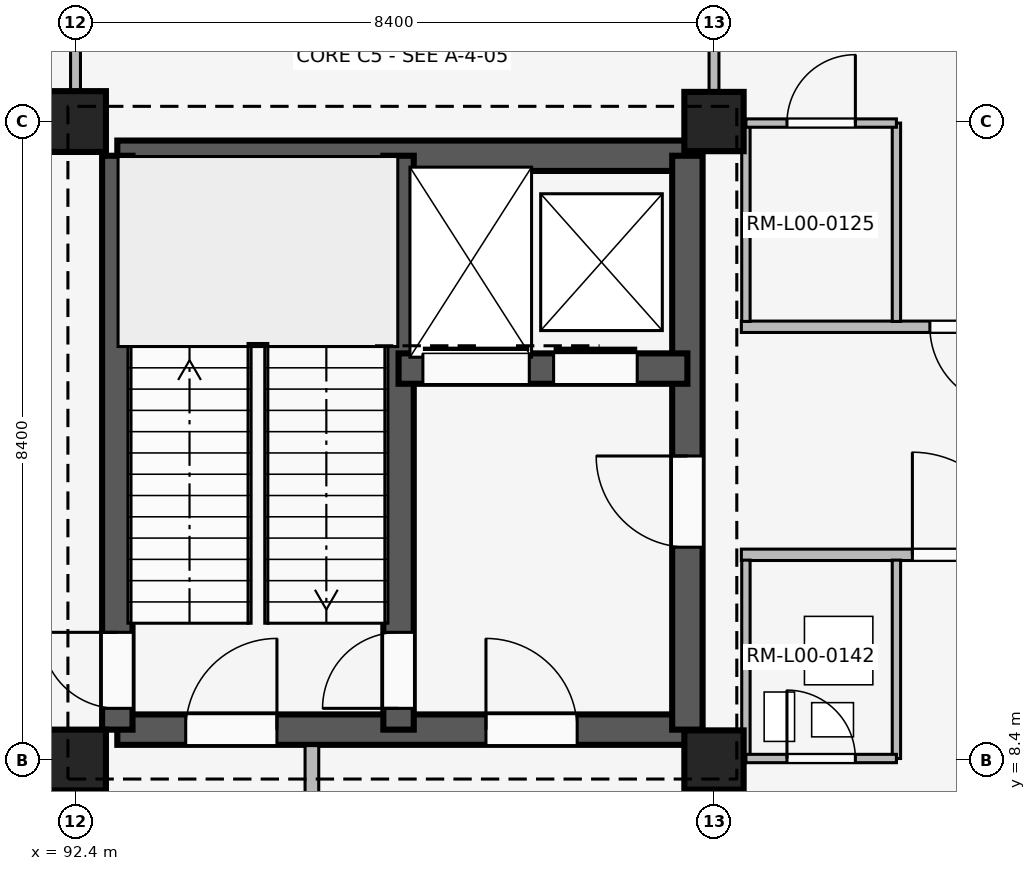
"""IFC4 building model, lengths in metres.
Left out: names, types, materials, properties, quantities, classifications, styles, units other than length and angle.
Written with IfcOpenShell. Run it as: python <this file> out.ifc"""

import sys

from ifc_helpers import new_model, si_unit, direction, frame, frame_2d, origin, origin_2d, place, context, subcontext, project, spatial, rectangle, extrude, element, fill, save


model = new_model("IFC4")
c1 = context("Model", 3, precision=1e-05, world=origin(), true_north=direction((0.0, 1.0)))
c2 = subcontext(c1, "Body", "Model", "MODEL_VIEW")
j1 = project(units=[si_unit("LENGTHUNIT", "METRE"), si_unit("PLANEANGLEUNIT", "RADIAN")], contexts=[c1])
p1 = place(None, origin())
s1 = spatial("IfcSite", under=j1, at=p1, CompositionType="ELEMENT")
p2 = place(p1, origin())
s2 = spatial("IfcBuilding", under=s1, at=p2, CompositionType="ELEMENT")
p3 = place(p2, origin())
s3 = spatial("IfcBuildingStorey", under=s2, at=p3, CompositionType="ELEMENT", Elevation=0.0)
for number, where, z_axis, x_axis in (
    (1, (92.4, 8.4, 0.0), (0.0, 0.0, 1.0), (1.0, 0.0, 0.0)),
    (2, (92.4, 16.8, 0.0), (0.0, 0.0, 1.0), (1.0, 0.0, 0.0)),
):
    element("IfcColumn", number, at=place(p3, frame(where, z_axis=z_axis, x_axis=x_axis)), inside=s3, PredefinedType="COLUMN", context=c2, shape_type="SweptSolid", body=[
        extrude(rectangle(XDim=0.8, YDim=0.8, at=origin_2d()), origin(), (0.0, 0.0, 1.0), 4.8),
    ])
for number, where, z_axis, x_axis in (
    (3, (100.8, 8.4, 0.0), (0.0, 0.0, 1.0), (1.0, 0.0, 0.0)),
    (4, (100.8, 16.8, 0.0), (0.0, 0.0, 1.0), (1.0, 0.0, 0.0)),
):
    element("IfcColumn", number, at=place(p3, frame(where, z_axis=z_axis, x_axis=x_axis)), inside=s3, PredefinedType="COLUMN", context=c2, shape_type="SweptSolid", body=[
        extrude(rectangle(XDim=0.78, YDim=0.78, at=origin_2d()), origin(), (0.0, 0.0, 1.0), 4.8),
    ])
p4 = place(p3, frame((92.95, 8.8, 0.0), z_axis=(0.0, 0.0, 1.0), x_axis=(1.0, 0.0, 0.0)))
e5 = element("IfcWall", 5, at=p4, inside=s3, PredefinedType="SHEAR", context=c2, shape_type="SweptSolid", body=[
    extrude(rectangle(XDim=7.5, YDim=0.4, at=frame_2d((3.75, 0.0))), origin(), (0.0, 0.0, 1.0), 4.52),
])
p5 = place(p4, frame((4.85, 0.0, 0.0)))
e6 = element("IfcOpeningElement", 6, at=p5, cuts=e5, PredefinedType="OPENING", context=c2, shape_type="SweptSolid", body=[
    extrude(rectangle(XDim=1.2, YDim=2.2, at=frame_2d((0.6, 1.1))), frame((0.0, 0.21, 0.0), z_axis=(0.0, -1.0, 0.0), x_axis=(1.0, 0.0, 0.0)), (0.0, 0.0, 1.0), 0.42),
])
p6 = place(p4, frame((0.9, 0.0, 0.0)))
e7 = element("IfcOpeningElement", 7, at=p6, cuts=e5, PredefinedType="OPENING", context=c2, shape_type="SweptSolid", body=[
    extrude(rectangle(XDim=1.2, YDim=2.2, at=frame_2d((0.6, 1.1))), frame((0.0, 0.21, 0.0), z_axis=(0.0, -1.0, 0.0), x_axis=(1.0, 0.0, 0.0)), (0.0, 0.0, 1.0), 0.42),
])
p7 = place(p3, frame((92.95, 16.35, 0.0), z_axis=(0.0, 0.0, 1.0), x_axis=(1.0, 0.0, 0.0)))
e8 = element("IfcWall", 8, at=p7, inside=s3, PredefinedType="SHEAR", context=c2, shape_type="SweptSolid", body=[
    extrude(rectangle(XDim=7.5, YDim=0.4, at=frame_2d((3.75, 0.0))), origin(), (0.0, 0.0, 1.0), 4.52),
])
p8 = place(p3, frame((92.95, 8.8, 0.0), z_axis=(0.0, 0.0, 1.0), x_axis=(0.0, 1.0, 0.0)))
e9 = element("IfcWall", 9, at=p8, inside=s3, PredefinedType="SHEAR", context=c2, shape_type="SweptSolid", body=[
    extrude(rectangle(XDim=7.55, YDim=0.4, at=frame_2d((3.775, 0.0))), origin(), (0.0, 0.0, 1.0), 4.52),
])
p9 = place(p8, frame((0.28, 0.0, 0.0)))
e10 = element("IfcOpeningElement", 10, at=p9, cuts=e9, PredefinedType="OPENING", context=c2, shape_type="SweptSolid", body=[
    extrude(rectangle(XDim=1.0, YDim=2.15, at=frame_2d((0.5, 1.075))), frame((0.0, 0.21, 0.0), z_axis=(0.0, -1.0, 0.0), x_axis=(1.0, 0.0, 0.0)), (0.0, 0.0, 1.0), 0.42),
])
p10 = place(p3, frame((100.45, 8.8, 0.0), z_axis=(0.0, 0.0, 1.0), x_axis=(0.0, 1.0, 0.0)))
e11 = element("IfcWall", 11, at=p10, inside=s3, PredefinedType="SHEAR", context=c2, shape_type="SweptSolid", body=[
    extrude(rectangle(XDim=7.55, YDim=0.4, at=frame_2d((3.775, 0.0))), origin(), (0.0, 0.0, 1.0), 4.52),
])
p11 = place(p10, frame((2.4, 0.0, 0.0)))
e12 = element("IfcOpeningElement", 12, at=p11, cuts=e11, PredefinedType="OPENING", context=c2, shape_type="SweptSolid", body=[
    extrude(rectangle(XDim=1.2, YDim=2.2, at=frame_2d((0.6, 1.1))), frame((0.0, 0.21, 0.0), z_axis=(0.0, -1.0, 0.0), x_axis=(1.0, 0.0, 0.0)), (0.0, 0.0, 1.0), 0.42),
])
p12 = place(p3, frame((96.65, 8.8, 0.0), z_axis=(0.0, 0.0, 1.0), x_axis=(0.0, 1.0, 0.0)))
e13 = element("IfcWall", 13, at=p12, inside=s3, PredefinedType="SHEAR", context=c2, shape_type="SweptSolid", body=[
    extrude(rectangle(XDim=7.55, YDim=0.4, at=frame_2d((3.775, 0.0))), origin(), (0.0, 0.0, 1.0), 4.52),
])
p13 = place(p12, frame((0.28, 0.0, 0.0)))
e14 = element("IfcOpeningElement", 14, at=p13, cuts=e13, PredefinedType="OPENING", context=c2, shape_type="SweptSolid", body=[
    extrude(rectangle(XDim=1.0, YDim=2.15, at=frame_2d((0.5, 1.075))), frame((0.0, 0.21, 0.0), z_axis=(0.0, -1.0, 0.0), x_axis=(1.0, 0.0, 0.0)), (0.0, 0.0, 1.0), 0.42),
])
p14 = place(p3, frame((96.65, 13.55, 0.0), z_axis=(0.0, 0.0, 1.0), x_axis=(1.0, 0.0, 0.0)))
e15 = element("IfcWall", 15, at=p14, inside=s3, PredefinedType="SHEAR", context=c2, shape_type="SweptSolid", body=[
    extrude(rectangle(XDim=3.8, YDim=0.4, at=frame_2d((1.9, 0.0))), origin(), (0.0, 0.0, 1.0), 4.52),
])
p15 = place(p14, frame((0.32, 0.0, 0.0)))
e16 = element("IfcOpeningElement", 16, at=p15, cuts=e15, PredefinedType="OPENING", context=c2, shape_type="SweptSolid", body=[
    extrude(rectangle(XDim=1.4, YDim=2.25, at=frame_2d((0.7, 1.125))), frame((0.0, 0.21, 0.0), z_axis=(0.0, -1.0, 0.0), x_axis=(1.0, 0.0, 0.0)), (0.0, 0.0, 1.0), 0.42),
])
p16 = place(p14, frame((2.04, 0.0, 0.0)))
e17 = element("IfcOpeningElement", 17, at=p16, cuts=e15, PredefinedType="OPENING", context=c2, shape_type="SweptSolid", body=[
    extrude(rectangle(XDim=1.1, YDim=2.15, at=frame_2d((0.55, 1.075))), frame((0.0, 0.21, 0.0), z_axis=(0.0, -1.0, 0.0), x_axis=(1.0, 0.0, 0.0)), (0.0, 0.0, 1.0), 0.42),
])
p17 = place(p3, frame((92.4, 0.14, 0.0), z_axis=(0.0, 0.0, 1.0), x_axis=(0.0, 1.0, 0.0)))
e18 = element("IfcWall", 18, at=p17, inside=s3, PredefinedType="PARTITIONING", context=c2, shape_type="SweptSolid", body=[
    extrude(rectangle(XDim=8.21, YDim=0.13, at=frame_2d((4.105, 0.0))), origin(), (0.0, 0.0, 1.0), 3.8),
])
p18 = place(p17, frame((3.64, 0.0, 0.0)))
e19 = element("IfcOpeningElement", 19, at=p18, cuts=e18, PredefinedType="OPENING", context=c2, shape_type="SweptSolid", body=[
    extrude(rectangle(XDim=1.08, YDim=2.15, at=frame_2d((0.54, 1.075))), frame((0.0, 0.075, 0.0), z_axis=(0.0, -1.0, 0.0), x_axis=(1.0, 0.0, 0.0)), (0.0, 0.0, 1.0), 0.15),
])
p19 = place(p3, frame((92.4, 17.15, 0.0), z_axis=(0.0, 0.0, 1.0), x_axis=(0.0, 1.0, 0.0)))
e20 = element("IfcWall", 20, at=p19, inside=s3, PredefinedType="PARTITIONING", context=c2, shape_type="SweptSolid", body=[
    extrude(rectangle(XDim=7.91, YDim=0.13, at=frame_2d((3.955, 0.0))), origin(), (0.0, 0.0, 1.0), 3.8),
])
p20 = place(p19, frame((3.4, 0.0, 0.0)))
e21 = element("IfcOpeningElement", 21, at=p20, cuts=e20, PredefinedType="OPENING", context=c2, shape_type="SweptSolid", body=[
    extrude(rectangle(XDim=1.05, YDim=2.2, at=frame_2d((0.525, 1.1))), frame((0.0, 0.075, 0.0), z_axis=(0.0, -1.0, 0.0), x_axis=(1.0, 0.0, 0.0)), (0.0, 0.0, 1.0), 0.15),
])
p21 = place(p3, frame((95.51, 0.14, 0.0), z_axis=(0.0, 0.0, 1.0), x_axis=(0.0, 1.0, 0.0)))
e22 = element("IfcWall", 22, at=p21, inside=s3, PredefinedType="PARTITIONING", context=c2, shape_type="SweptSolid", body=[
    extrude(rectangle(XDim=8.45, YDim=0.18, at=frame_2d((4.225, 0.0))), origin(), (0.0, 0.0, 1.0), 3.8),
])
p22 = place(p3, frame((100.8, 0.14, 0.0), z_axis=(0.0, 0.0, 1.0), x_axis=(0.0, 1.0, 0.0)))
e23 = element("IfcWall", 23, at=p22, inside=s3, PredefinedType="PARTITIONING", context=c2, shape_type="SweptSolid", body=[
    extrude(rectangle(XDim=8.21, YDim=0.13, at=frame_2d((4.105, 0.0))), origin(), (0.0, 0.0, 1.0), 3.8),
])
p23 = place(p22, frame((3.64, 0.0, 0.0)))
e24 = element("IfcOpeningElement", 24, at=p23, cuts=e23, PredefinedType="OPENING", context=c2, shape_type="SweptSolid", body=[
    extrude(rectangle(XDim=1.08, YDim=2.15, at=frame_2d((0.54, 1.075))), frame((0.0, 0.075, 0.0), z_axis=(0.0, -1.0, 0.0), x_axis=(1.0, 0.0, 0.0)), (0.0, 0.0, 1.0), 0.15),
])
p24 = place(p3, frame((100.8, 17.15, 0.0), z_axis=(0.0, 0.0, 1.0), x_axis=(0.0, 1.0, 0.0)))
e25 = element("IfcWall", 25, at=p24, inside=s3, PredefinedType="PARTITIONING", context=c2, shape_type="SweptSolid", body=[
    extrude(rectangle(XDim=7.91, YDim=0.13, at=frame_2d((3.955, 0.0))), origin(), (0.0, 0.0, 1.0), 3.8),
])
p25 = place(p24, frame((3.4, 0.0, 0.0)))
e26 = element("IfcOpeningElement", 26, at=p25, cuts=e25, PredefinedType="OPENING", context=c2, shape_type="SweptSolid", body=[
    extrude(rectangle(XDim=1.05, YDim=2.2, at=frame_2d((0.525, 1.1))), frame((0.0, 0.075, 0.0), z_axis=(0.0, -1.0, 0.0), x_axis=(1.0, 0.0, 0.0)), (0.0, 0.0, 1.0), 0.15),
])
p26 = place(p3, frame((101.16, 11.1, 0.0), z_axis=(0.0, 0.0, 1.0), x_axis=(1.0, 0.0, 0.0)))
e27 = element("IfcWall", 27, at=p26, inside=s3, PredefinedType="PARTITIONING", context=c2, shape_type="SweptSolid", body=[
    extrude(rectangle(XDim=7.96, YDim=0.15, at=frame_2d((3.98, 0.0))), origin(), (0.0, 0.0, 1.0), 3.8),
])
p27 = place(p26, frame((2.25, 0.0, 0.0)))
e28 = element("IfcOpeningElement", 28, at=p27, cuts=e27, PredefinedType="OPENING", context=c2, shape_type="SweptSolid", body=[
    extrude(rectangle(XDim=1.35, YDim=2.25, at=frame_2d((0.675, 1.125))), frame((0.0, 0.085, 0.0), z_axis=(0.0, -1.0, 0.0), x_axis=(1.0, 0.0, 0.0)), (0.0, 0.0, 1.0), 0.17),
])
p28 = place(p26, frame((5.95, 0.0, 0.0)))
e29 = element("IfcOpeningElement", 29, at=p28, cuts=e27, PredefinedType="OPENING", context=c2, shape_type="SweptSolid", body=[
    extrude(rectangle(XDim=1.35, YDim=2.25, at=frame_2d((0.675, 1.125))), frame((0.0, 0.085, 0.0), z_axis=(0.0, -1.0, 0.0), x_axis=(1.0, 0.0, 0.0)), (0.0, 0.0, 1.0), 0.17),
])
for number, where, z_axis, x_axis in (
    (30, (101.22, 8.42, 0.0), (0.0, 0.0, 1.0), (0.0, 1.0, 0.0)),
    (31, (103.2, 8.42, 0.0), (0.0, 0.0, 1.0), (0.0, 1.0, 0.0)),
):
    element("IfcWall", number, at=place(p3, frame(where, z_axis=z_axis, x_axis=x_axis)), inside=s3, PredefinedType="PARTITIONING", context=c2, shape_type="SweptSolid", body=[
        extrude(rectangle(XDim=2.61, YDim=0.11, at=frame_2d((1.305, 0.0))), origin(), (0.0, 0.0, 1.0), 3.8),
    ])
p29 = place(p3, frame((101.22, 8.42, 0.0), z_axis=(0.0, 0.0, 1.0), x_axis=(1.0, 0.0, 0.0)))
e32 = element("IfcWall", 32, at=p29, inside=s3, PredefinedType="PARTITIONING", context=c2, shape_type="SweptSolid", body=[
    extrude(rectangle(XDim=1.98, YDim=0.11, at=frame_2d((0.99, 0.0))), origin(), (0.0, 0.0, 1.0), 3.8),
])
p30 = place(p29, frame((0.54, 0.0, 0.0)))
e33 = element("IfcOpeningElement", 33, at=p30, cuts=e32, PredefinedType="OPENING", context=c2, shape_type="SweptSolid", body=[
    extrude(rectangle(XDim=0.9, YDim=2.1, at=frame_2d((0.45, 1.05))), frame((0.0, 0.065, 0.0), z_axis=(0.0, -1.0, 0.0), x_axis=(1.0, 0.0, 0.0)), (0.0, 0.0, 1.0), 0.13),
])
p31 = place(p3, frame((109.12, 14.1, 0.0), z_axis=(0.0, 0.0, 1.0), x_axis=(-1.0, 0.0, 0.0)))
e34 = element("IfcWall", 34, at=p31, inside=s3, PredefinedType="PARTITIONING", context=c2, shape_type="SweptSolid", body=[
    extrude(rectangle(XDim=7.96, YDim=0.15, at=frame_2d((3.98, 0.0))), origin(), (0.0, 0.0, 1.0), 3.8),
])
p32 = place(p31, frame((0.73, 0.0, 0.0)))
e35 = element("IfcOpeningElement", 35, at=p32, cuts=e34, PredefinedType="OPENING", context=c2, shape_type="SweptSolid", body=[
    extrude(rectangle(XDim=1.05, YDim=2.2, at=frame_2d((0.525, 1.1))), frame((0.0, 0.085, 0.0), z_axis=(0.0, -1.0, 0.0), x_axis=(1.0, 0.0, 0.0)), (0.0, 0.0, 1.0), 0.17),
])
p33 = place(p31, frame((4.43, 0.0, 0.0)))
e36 = element("IfcOpeningElement", 36, at=p33, cuts=e34, PredefinedType="OPENING", context=c2, shape_type="SweptSolid", body=[
    extrude(rectangle(XDim=1.05, YDim=2.2, at=frame_2d((0.525, 1.1))), frame((0.0, 0.085, 0.0), z_axis=(0.0, -1.0, 0.0), x_axis=(1.0, 0.0, 0.0)), (0.0, 0.0, 1.0), 0.17),
])
for number, where, z_axis, x_axis in (
    (37, (101.22, 14.17, 0.0), (0.0, 0.0, 1.0), (0.0, 1.0, 0.0)),
    (38, (103.2, 14.17, 0.0), (0.0, 0.0, 1.0), (0.0, 1.0, 0.0)),
):
    element("IfcWall", number, at=place(p3, frame(where, z_axis=z_axis, x_axis=x_axis)), inside=s3, PredefinedType="PARTITIONING", context=c2, shape_type="SweptSolid", body=[
        extrude(rectangle(XDim=2.61, YDim=0.11, at=frame_2d((1.305, 0.0))), origin(), (0.0, 0.0, 1.0), 3.8),
    ])
p34 = place(p3, frame((101.22, 16.78, 0.0), z_axis=(0.0, 0.0, 1.0), x_axis=(1.0, 0.0, 0.0)))
e39 = element("IfcWall", 39, at=p34, inside=s3, PredefinedType="PARTITIONING", context=c2, shape_type="SweptSolid", body=[
    extrude(rectangle(XDim=1.98, YDim=0.11, at=frame_2d((0.99, 0.0))), origin(), (0.0, 0.0, 1.0), 3.8),
])
p35 = place(p34, frame((0.54, 0.0, 0.0)))
e40 = element("IfcOpeningElement", 40, at=p35, cuts=e39, PredefinedType="OPENING", context=c2, shape_type="SweptSolid", body=[
    extrude(rectangle(XDim=0.9, YDim=2.1, at=frame_2d((0.45, 1.05))), frame((0.0, 0.065, 0.0), z_axis=(0.0, -1.0, 0.0), x_axis=(1.0, 0.0, 0.0)), (0.0, 0.0, 1.0), 0.13),
])
p36 = place(p11, origin())
e41 = element("IfcDoor", 41, at=p36, inside=s3, OperationType="SINGLE_SWING_RIGHT", PredefinedType="DOOR", context=c2, shape_type="SweptSolid", body=[
    extrude(rectangle(XDim=1.2, YDim=2.2, at=frame_2d((0.6, 1.1))), frame((0.0, 0.025, 0.0), z_axis=(0.0, -1.0, 0.0), x_axis=(1.0, 0.0, 0.0)), (0.0, 0.0, 1.0), 0.05),
])
fill(e12, e41)
p37 = place(p5, origin())
e42 = element("IfcDoor", 42, at=p37, inside=s3, OperationType="SINGLE_SWING_LEFT", PredefinedType="DOOR", context=c2, shape_type="SweptSolid", body=[
    extrude(rectangle(XDim=1.2, YDim=2.2, at=frame_2d((0.6, 1.1))), frame((0.0, 0.025, 0.0), z_axis=(0.0, -1.0, 0.0), x_axis=(1.0, 0.0, 0.0)), (0.0, 0.0, 1.0), 0.05),
])
fill(e6, e42)
p38 = place(p9, origin())
e43 = element("IfcDoor", 43, at=p38, inside=s3, OperationType="SINGLE_SWING_RIGHT", PredefinedType="DOOR", context=c2, shape_type="SweptSolid", body=[
    extrude(rectangle(XDim=1.0, YDim=2.15, at=frame_2d((0.5, 1.075))), frame((0.0, 0.025, 0.0), z_axis=(0.0, -1.0, 0.0), x_axis=(1.0, 0.0, 0.0)), (0.0, 0.0, 1.0), 0.05),
])
fill(e10, e43)
p39 = place(p13, origin())
e44 = element("IfcDoor", 44, at=p39, inside=s3, OperationType="SINGLE_SWING_LEFT", PredefinedType="DOOR", context=c2, shape_type="SweptSolid", body=[
    extrude(rectangle(XDim=1.0, YDim=2.15, at=frame_2d((0.5, 1.075))), frame((0.0, 0.025, 0.0), z_axis=(0.0, -1.0, 0.0), x_axis=(1.0, 0.0, 0.0)), (0.0, 0.0, 1.0), 0.05),
])
fill(e14, e44)
p40 = place(p6, origin())
e45 = element("IfcDoor", 45, at=p40, inside=s3, OperationType="SINGLE_SWING_RIGHT", PredefinedType="DOOR", context=c2, shape_type="SweptSolid", body=[
    extrude(rectangle(XDim=1.2, YDim=2.2, at=frame_2d((0.6, 1.1))), frame((0.0, 0.025, 0.0), z_axis=(0.0, -1.0, 0.0), x_axis=(1.0, 0.0, 0.0)), (0.0, 0.0, 1.0), 0.05),
])
fill(e7, e45)
p41 = place(p15, origin())
e46 = element("IfcDoor", 46, at=p41, inside=s3, OperationType="SLIDING_TO_LEFT", PredefinedType="DOOR", context=c2, shape_type="SweptSolid", body=[
    extrude(rectangle(XDim=1.4, YDim=2.25, at=frame_2d((0.7, 1.125))), frame((0.0, 0.025, 0.0), z_axis=(0.0, -1.0, 0.0), x_axis=(1.0, 0.0, 0.0)), (0.0, 0.0, 1.0), 0.05),
])
fill(e16, e46)
p42 = place(p16, origin())
e47 = element("IfcDoor", 47, at=p42, inside=s3, OperationType="SLIDING_TO_LEFT", PredefinedType="DOOR", context=c2, shape_type="SweptSolid", body=[
    extrude(rectangle(XDim=1.1, YDim=2.15, at=frame_2d((0.55, 1.075))), frame((0.0, 0.025, 0.0), z_axis=(0.0, -1.0, 0.0), x_axis=(1.0, 0.0, 0.0)), (0.0, 0.0, 1.0), 0.05),
])
fill(e17, e47)
p43 = place(p27, origin())
e48 = element("IfcDoor", 48, at=p43, inside=s3, OperationType="SINGLE_SWING_LEFT", PredefinedType="DOOR", context=c2, shape_type="SweptSolid", body=[
    extrude(rectangle(XDim=1.35, YDim=2.25, at=frame_2d((0.675, 1.125))), frame((0.0, 0.025, 0.0), z_axis=(0.0, -1.0, 0.0), x_axis=(1.0, 0.0, 0.0)), (0.0, 0.0, 1.0), 0.05),
])
fill(e28, e48)
p44 = place(p30, origin())
e49 = element("IfcDoor", 49, at=p44, inside=s3, OperationType="SINGLE_SWING_LEFT", PredefinedType="DOOR", context=c2, shape_type="SweptSolid", body=[
    extrude(rectangle(XDim=0.9, YDim=2.1, at=frame_2d((0.45, 1.05))), frame((0.0, 0.025, 0.0), z_axis=(0.0, -1.0, 0.0), x_axis=(1.0, 0.0, 0.0)), (0.0, 0.0, 1.0), 0.05),
])
fill(e33, e49)
p45 = place(p33, origin())
e50 = element("IfcDoor", 50, at=p45, inside=s3, OperationType="SINGLE_SWING_LEFT", PredefinedType="DOOR", context=c2, shape_type="SweptSolid", body=[
    extrude(rectangle(XDim=1.05, YDim=2.2, at=frame_2d((0.525, 1.1))), frame((0.0, 0.025, 0.0), z_axis=(0.0, -1.0, 0.0), x_axis=(1.0, 0.0, 0.0)), (0.0, 0.0, 1.0), 0.05),
])
fill(e36, e50)
p46 = place(p35, origin())
e51 = element("IfcDoor", 51, at=p46, inside=s3, OperationType="SINGLE_SWING_RIGHT", PredefinedType="DOOR", context=c2, shape_type="SweptSolid", body=[
    extrude(rectangle(XDim=0.9, YDim=2.1, at=frame_2d((0.45, 1.05))), frame((0.0, 0.025, 0.0), z_axis=(0.0, -1.0, 0.0), x_axis=(1.0, 0.0, 0.0)), (0.0, 0.0, 1.0), 0.05),
])
fill(e40, e51)
save(model, sys.argv[1])
